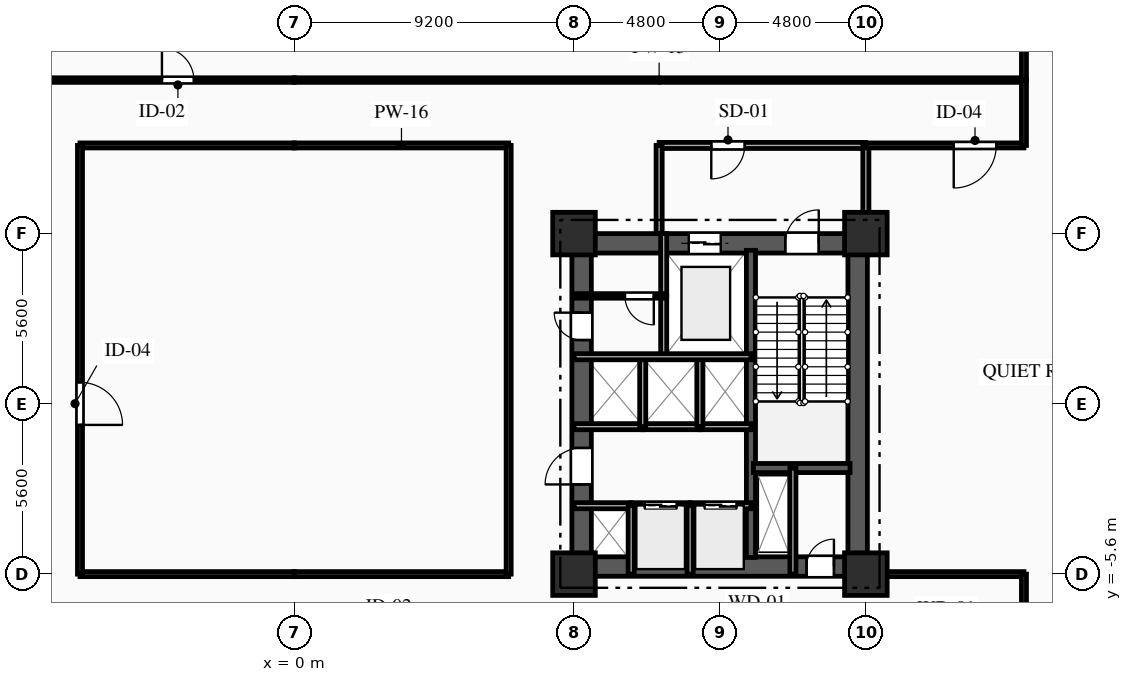
"""IFC4 building model, lengths in metres.
Left out: names, types, materials, properties, quantities, classifications, styles, units other than length and angle.
Written with IfcOpenShell. Run it as: python <this file> out.ifc"""

import sys

from ifc_helpers import new_model, si_unit, direction, frame, frame_2d, origin, origin_2d, place, context, subcontext, project, spatial, rectangle, extrude, element, fill, save


model = new_model("IFC4")
c1 = context("Model", 3, precision=1e-05, world=origin(), true_north=direction((0.0, 1.0)))
c2 = subcontext(c1, "Body", "Model", "MODEL_VIEW")
j1 = project(units=[si_unit("LENGTHUNIT", "METRE"), si_unit("PLANEANGLEUNIT", "RADIAN")], contexts=[c1])
p1 = place(None, origin())
s1 = spatial("IfcSite", under=j1, at=p1, CompositionType="ELEMENT")
p2 = place(p1, origin())
s2 = spatial("IfcBuilding", under=s1, at=p2, CompositionType="ELEMENT")
p3 = place(p2, frame((0.0, 0.0, 4.5)))
s3 = spatial("IfcBuildingStorey", under=s2, at=p3, CompositionType="ELEMENT", Elevation=4.5)
for number, where, z_axis, x_axis in (
    (1, (9.2, -5.6, 0.0), (0.0, 0.0, 1.0), (1.0, 0.0, 0.0)),
    (2, (9.2, 5.6, 0.0), (0.0, 0.0, 1.0), (1.0, 0.0, 0.0)),
    (3, (18.8, -5.6, 0.0), (0.0, 0.0, 1.0), (1.0, 0.0, 0.0)),
    (4, (18.8, 5.6, 0.0), (0.0, 0.0, 1.0), (1.0, 0.0, 0.0)),
):
    element("IfcColumn", number, at=place(p3, frame(where, z_axis=z_axis, x_axis=x_axis)), inside=s3, PredefinedType="COLUMN", context=c2, shape_type="SweptSolid", body=[
        extrude(rectangle(XDim=1.4, YDim=1.4, at=origin_2d()), origin(), (0.0, 0.0, 1.0), 4.5),
    ])
p4 = place(p3, frame((9.2, 5.28, 0.0), z_axis=(0.0, 0.0, 1.0), x_axis=(1.0, 0.0, 0.0)))
e5 = element("IfcWall", 5, at=p4, inside=s3, PredefinedType="SHEAR", context=c2, shape_type="SweptSolid", body=[
    extrude(rectangle(XDim=9.6, YDim=0.64, at=frame_2d((4.8, 0.0))), origin(), (0.0, 0.0, 1.0), 4.17),
])
p5 = place(p4, frame((6.95, 0.0, 0.0)))
e6 = element("IfcOpeningElement", 6, at=p5, cuts=e5, PredefinedType="OPENING", context=c2, shape_type="SweptSolid", body=[
    extrude(rectangle(XDim=1.1, YDim=2.15, at=frame_2d((0.55, 1.075))), frame((0.0, 0.33, 0.0), z_axis=(0.0, -1.0, 0.0), x_axis=(1.0, 0.0, 0.0)), (0.0, 0.0, 1.0), 0.66),
])
p6 = place(p4, frame((3.775, 0.0, 0.0)))
e7 = element("IfcOpeningElement", 7, at=p6, cuts=e5, PredefinedType="OPENING", context=c2, shape_type="SweptSolid", body=[
    extrude(rectangle(XDim=1.05, YDim=2.1, at=frame_2d((0.525, 1.05))), frame((0.0, 0.33, 0.0), z_axis=(0.0, -1.0, 0.0), x_axis=(1.0, 0.0, 0.0)), (0.0, 0.0, 1.0), 0.66),
])
p7 = place(p3, frame((9.2, -5.35, 0.0), z_axis=(0.0, 0.0, 1.0), x_axis=(1.0, 0.0, 0.0)))
e8 = element("IfcWall", 8, at=p7, inside=s3, PredefinedType="SHEAR", context=c2, shape_type="SweptSolid", body=[
    extrude(rectangle(XDim=9.6, YDim=0.64, at=frame_2d((4.8, 0.0))), origin(), (0.0, 0.0, 1.0), 4.17),
])
p8 = place(p7, frame((7.65, 0.0, 0.0)))
e9 = element("IfcOpeningElement", 9, at=p8, cuts=e8, PredefinedType="OPENING", context=c2, shape_type="SweptSolid", body=[
    extrude(rectangle(XDim=0.9, YDim=2.1, at=frame_2d((0.45, 1.05))), frame((0.0, 0.33, 0.0), z_axis=(0.0, -1.0, 0.0), x_axis=(1.0, 0.0, 0.0)), (0.0, 0.0, 1.0), 0.66),
])
p9 = place(p3, frame((9.45, -5.05, 0.0), z_axis=(0.0, 0.0, 1.0), x_axis=(0.0, 1.0, 0.0)))
e10 = element("IfcWall", 10, at=p9, inside=s3, PredefinedType="SHEAR", context=c2, shape_type="SweptSolid", body=[
    extrude(rectangle(XDim=10.1, YDim=0.64, at=frame_2d((5.05, 0.0))), origin(), (0.0, 0.0, 1.0), 4.17),
])
p10 = place(p9, frame((7.15, 0.0, 0.0)))
e11 = element("IfcOpeningElement", 11, at=p10, cuts=e10, PredefinedType="OPENING", context=c2, shape_type="SweptSolid", body=[
    extrude(rectangle(XDim=0.9, YDim=2.1, at=frame_2d((0.45, 1.05))), frame((0.0, 0.33, 0.0), z_axis=(0.0, -1.0, 0.0), x_axis=(1.0, 0.0, 0.0)), (0.0, 0.0, 1.0), 0.66),
])
p11 = place(p9, frame((2.4, 0.0, 0.0)))
e12 = element("IfcOpeningElement", 12, at=p11, cuts=e10, PredefinedType="OPENING", context=c2, shape_type="SweptSolid", body=[
    extrude(rectangle(XDim=1.2, YDim=2.15, at=frame_2d((0.6, 1.075))), frame((0.0, 0.33, 0.0), z_axis=(0.0, -1.0, 0.0), x_axis=(1.0, 0.0, 0.0)), (0.0, 0.0, 1.0), 0.66),
])
p12 = place(p3, frame((18.53, -5.05, 0.0), z_axis=(0.0, 0.0, 1.0), x_axis=(0.0, 1.0, 0.0)))
e13 = element("IfcWall", 13, at=p12, inside=s3, PredefinedType="SHEAR", context=c2, shape_type="SweptSolid", body=[
    extrude(rectangle(XDim=10.1, YDim=0.64, at=frame_2d((5.05, 0.0))), origin(), (0.0, 0.0, 1.0), 4.17),
])
p13 = place(p3, frame((15.02, -5.05, 0.0), z_axis=(0.0, 0.0, 1.0), x_axis=(0.0, 1.0, 0.0)))
e14 = element("IfcWall", 14, at=p13, inside=s3, PredefinedType="SHEAR", context=c2, shape_type="SweptSolid", body=[
    extrude(rectangle(XDim=10.1, YDim=0.3, at=frame_2d((5.05, 0.0))), origin(), (0.0, 0.0, 1.0), 4.17),
])
p14 = place(p3, frame((15.1, -2.11, 0.0), z_axis=(0.0, 0.0, 1.0), x_axis=(1.0, 0.0, 0.0)))
e15 = element("IfcWall", 15, at=p14, inside=s3, PredefinedType="SHEAR", context=c2, shape_type="SweptSolid", body=[
    extrude(rectangle(XDim=3.18, YDim=0.3, at=frame_2d((1.59, 0.0))), origin(), (0.0, 0.0, 1.0), 4.17),
])
p15 = place(p3, frame((16.4, -2.11, 0.0), z_axis=(0.0, 0.0, 1.0), x_axis=(0.0, -1.0, 0.0)))
e16 = element("IfcWall", 16, at=p15, inside=s3, PredefinedType="PARTITIONING", context=c2, shape_type="SweptSolid", body=[
    extrude(rectangle(XDim=3.49, YDim=0.2, at=frame_2d((1.745, 0.0))), origin(), (0.0, 0.0, 1.0), 4.17),
])
p16 = place(p3, frame((12.15, 3.55, 0.0), z_axis=(0.0, 0.0, 1.0), x_axis=(0.0, -1.0, 0.0)))
e17 = element("IfcWall", 17, at=p16, inside=s3, PredefinedType="PARTITIONING", context=c2, shape_type="SweptSolid", body=[
    extrude(rectangle(XDim=2.0, YDim=0.2, at=frame_2d((1.0, 0.0))), origin(), (0.0, 0.0, 1.0), 4.17),
])
p17 = place(p3, frame((12.15, 5.6, 0.0), z_axis=(0.0, 0.0, 1.0), x_axis=(0.0, -1.0, 0.0)))
e18 = element("IfcWall", 18, at=p17, inside=s3, PredefinedType="PARTITIONING", context=c2, shape_type="SweptSolid", body=[
    extrude(rectangle(XDim=2.05, YDim=0.2, at=frame_2d((1.025, 0.0))), origin(), (0.0, 0.0, 1.0), 4.17),
])
p18 = place(p3, frame((18.8, 8.5, 0.0), z_axis=(0.0, 0.0, 1.0), x_axis=(-1.0, 0.0, 0.0)))
e19 = element("IfcWall", 19, at=p18, inside=s3, PredefinedType="PARTITIONING", context=c2, shape_type="SweptSolid", body=[
    extrude(rectangle(XDim=6.8, YDim=0.2, at=frame_2d((3.4, 0.0))), origin(), (0.0, 0.0, 1.0), 4.17),
])
p19 = place(p18, frame((3.985, 0.0, 0.0)))
e20 = element("IfcOpeningElement", 20, at=p19, cuts=e19, PredefinedType="OPENING", context=c2, shape_type="SweptSolid", body=[
    extrude(rectangle(XDim=1.1, YDim=2.15, at=frame_2d((0.55, 1.075))), frame((0.0, 0.11, 0.0), z_axis=(0.0, -1.0, 0.0), x_axis=(1.0, 0.0, 0.0)), (0.0, 0.0, 1.0), 0.22),
])
p20 = place(p3, frame((12.0, 8.5, 0.0), z_axis=(0.0, 0.0, 1.0), x_axis=(0.0, -1.0, 0.0)))
e21 = element("IfcWall", 21, at=p20, inside=s3, PredefinedType="PARTITIONING", context=c2, shape_type="SweptSolid", body=[
    extrude(rectangle(XDim=2.9, YDim=0.2, at=frame_2d((1.45, 0.0))), origin(), (0.0, 0.0, 1.0), 4.17),
])
p21 = place(p3, frame((18.8, 5.6, 0.0), z_axis=(0.0, 0.0, 1.0), x_axis=(0.0, 1.0, 0.0)))
e22 = element("IfcWall", 22, at=p21, inside=s3, PredefinedType="PARTITIONING", context=c2, shape_type="SweptSolid", body=[
    extrude(rectangle(XDim=2.9, YDim=0.2, at=frame_2d((1.45, 0.0))), origin(), (0.0, 0.0, 1.0), 3.655),
])
p22 = place(p3, frame((12.15, 3.55, 0.0), z_axis=(0.0, 0.0, 1.0), x_axis=(-1.0, 0.0, 0.0)))
e23 = element("IfcWall", 23, at=p22, inside=s3, PredefinedType="PARTITIONING", context=c2, shape_type="SweptSolid", body=[
    extrude(rectangle(XDim=2.95, YDim=0.15, at=frame_2d((1.475, 0.0))), origin(), (0.0, 0.0, 1.0), 4.17),
])
p23 = place(p22, frame((0.325, 0.0, 0.0)))
e24 = element("IfcOpeningElement", 24, at=p23, cuts=e23, PredefinedType="OPENING", context=c2, shape_type="SweptSolid", body=[
    extrude(rectangle(XDim=0.95, YDim=2.1, at=frame_2d((0.475, 1.05))), frame((0.0, 0.085, 0.0), z_axis=(0.0, -1.0, 0.0), x_axis=(1.0, 0.0, 0.0)), (0.0, 0.0, 1.0), 0.17),
])
p24 = place(p3, frame((9.2, -3.35, 0.0), z_axis=(0.0, 0.0, 1.0), x_axis=(1.0, 0.0, 0.0)))
e25 = element("IfcWall", 25, at=p24, inside=s3, PredefinedType="PARTITIONING", context=c2, shape_type="SweptSolid", body=[
    extrude(rectangle(XDim=1.88, YDim=0.2, at=frame_2d((0.94, 0.0))), origin(), (0.0, 0.0, 1.0), 3.885),
])
p25 = place(p3, frame((11.08, -3.35, 0.0), z_axis=(0.0, 0.0, 1.0), x_axis=(1.0, 0.0, 0.0)))
e26 = element("IfcWall", 26, at=p25, inside=s3, PredefinedType="PARTITIONING", context=c2, shape_type="SweptSolid", body=[
    extrude(rectangle(XDim=1.94, YDim=0.2, at=frame_2d((0.97, 0.0))), origin(), (0.0, 0.0, 1.0), 4.17),
])
p26 = place(p25, frame((0.445, 0.0, 0.0)))
e27 = element("IfcOpeningElement", 27, at=p26, cuts=e26, PredefinedType="OPENING", context=c2, shape_type="SweptSolid", body=[
    extrude(rectangle(XDim=1.05, YDim=2.1, at=frame_2d((0.525, 1.05))), frame((0.0, 0.11, 0.0), z_axis=(0.0, -1.0, 0.0), x_axis=(1.0, 0.0, 0.0)), (0.0, 0.0, 1.0), 0.22),
])
p27 = place(p3, frame((13.02, -3.35, 0.0), z_axis=(0.0, 0.0, 1.0), x_axis=(1.0, 0.0, 0.0)))
e28 = element("IfcWall", 28, at=p27, inside=s3, PredefinedType="PARTITIONING", context=c2, shape_type="SweptSolid", body=[
    extrude(rectangle(XDim=2.0, YDim=0.2, at=frame_2d((1.0, 0.0))), origin(), (0.0, 0.0, 1.0), 4.17),
])
p28 = place(p27, frame((0.475, 0.0, 0.0)))
e29 = element("IfcOpeningElement", 29, at=p28, cuts=e28, PredefinedType="OPENING", context=c2, shape_type="SweptSolid", body=[
    extrude(rectangle(XDim=1.05, YDim=2.1, at=frame_2d((0.525, 1.05))), frame((0.0, 0.11, 0.0), z_axis=(0.0, -1.0, 0.0), x_axis=(1.0, 0.0, 0.0)), (0.0, 0.0, 1.0), 0.22),
])
p29 = place(p3, frame((11.46, -0.75, 0.0), z_axis=(0.0, 0.0, 1.0), x_axis=(-1.0, 0.0, 0.0)))
e30 = element("IfcWall", 30, at=p29, inside=s3, PredefinedType="PARTITIONING", context=c2, shape_type="SweptSolid", body=[
    extrude(rectangle(XDim=2.26, YDim=0.2, at=frame_2d((1.13, 0.0))), origin(), (0.0, 0.0, 1.0), 4.17),
])
p30 = place(p3, frame((13.34, -0.75, 0.0), z_axis=(0.0, 0.0, 1.0), x_axis=(-1.0, 0.0, 0.0)))
e31 = element("IfcWall", 31, at=p30, inside=s3, PredefinedType="PARTITIONING", context=c2, shape_type="SweptSolid", body=[
    extrude(rectangle(XDim=1.88, YDim=0.2, at=frame_2d((0.94, 0.0))), origin(), (0.0, 0.0, 1.0), 4.17),
])
p31 = place(p3, frame((15.02, -0.75, 0.0), z_axis=(0.0, 0.0, 1.0), x_axis=(-1.0, 0.0, 0.0)))
e32 = element("IfcWall", 32, at=p31, inside=s3, PredefinedType="PARTITIONING", context=c2, shape_type="SweptSolid", body=[
    extrude(rectangle(XDim=1.68, YDim=0.2, at=frame_2d((0.84, 0.0))), origin(), (0.0, 0.0, 1.0), 4.17),
])
for number, where, z_axis, x_axis in (
    (33, (11.08, -5.6, 0.0), (0.0, 0.0, 1.0), (0.0, 1.0, 0.0)),
    (34, (13.02, -5.6, 0.0), (0.0, 0.0, 1.0), (0.0, 1.0, 0.0)),
):
    element("IfcWall", number, at=place(p3, frame(where, z_axis=z_axis, x_axis=x_axis)), inside=s3, PredefinedType="PARTITIONING", context=c2, shape_type="SweptSolid", body=[
        extrude(rectangle(XDim=2.25, YDim=0.2, at=frame_2d((1.125, 0.0))), origin(), (0.0, 0.0, 1.0), 4.17),
    ])
for number, where, z_axis, x_axis in (
    (35, (11.46, -0.75, 0.0), (0.0, 0.0, 1.0), (0.0, 1.0, 0.0)),
    (36, (13.34, -0.75, 0.0), (0.0, 0.0, 1.0), (0.0, 1.0, 0.0)),
):
    element("IfcWall", number, at=place(p3, frame(where, z_axis=z_axis, x_axis=x_axis)), inside=s3, PredefinedType="PARTITIONING", context=c2, shape_type="SweptSolid", body=[
        extrude(rectangle(XDim=2.3, YDim=0.2, at=frame_2d((1.15, 0.0))), origin(), (0.0, 0.0, 1.0), 4.17),
    ])
p32 = place(p3, frame((-24.0, 10.65, 0.0), z_axis=(0.0, 0.0, 1.0), x_axis=(1.0, 0.0, 0.0)))
e37 = element("IfcWall", 37, at=p32, inside=s3, PredefinedType="PARTITIONING", context=c2, shape_type="SweptSolid", body=[
    extrude(rectangle(XDim=24.0, YDim=0.15, at=frame_2d((12.0, 0.0))), origin(), (0.0, 0.0, 1.0), 4.17),
])
p33 = place(p32, frame((19.646, 0.0, 0.0)))
e38 = element("IfcOpeningElement", 38, at=p33, cuts=e37, PredefinedType="OPENING", context=c2, shape_type="SweptSolid", body=[
    extrude(rectangle(XDim=1.05, YDim=2.15, at=frame_2d((0.525, 1.075))), frame((0.0, 0.085, 0.0), z_axis=(0.0, -1.0, 0.0), x_axis=(1.0, 0.0, 0.0)), (0.0, 0.0, 1.0), 0.17),
])
p34 = place(p3, frame((0.0, 8.5, 0.0), z_axis=(0.0, 0.0, 1.0), x_axis=(-1.0, 0.0, 0.0)))
e39 = element("IfcWall", 39, at=p34, inside=s3, PredefinedType="PARTITIONING", context=c2, shape_type="SweptSolid", body=[
    extrude(rectangle(XDim=7.05, YDim=0.165, at=frame_2d((3.525, 0.0))), origin(), (0.0, 0.0, 1.0), 4.17),
])
p35 = place(p3, frame((0.0, 10.65, 0.0), z_axis=(0.0, 0.0, 1.0), x_axis=(1.0, 0.0, 0.0)))
e40 = element("IfcWall", 40, at=p35, inside=s3, PredefinedType="PARTITIONING", context=c2, shape_type="SweptSolid", body=[
    extrude(rectangle(XDim=24.0, YDim=0.15, at=frame_2d((12.0, 0.0))), origin(), (0.0, 0.0, 1.0), 4.17),
])
p36 = place(p3, frame((7.05, 8.5, 0.0), z_axis=(0.0, 0.0, 1.0), x_axis=(-1.0, 0.0, 0.0)))
e41 = element("IfcWall", 41, at=p36, inside=s3, PredefinedType="PARTITIONING", context=c2, shape_type="SweptSolid", body=[
    extrude(rectangle(XDim=7.05, YDim=0.165, at=frame_2d((3.525, 0.0))), origin(), (0.0, 0.0, 1.0), 4.17),
])
p37 = place(p3, frame((24.0, 8.5, 0.0), z_axis=(0.0, 0.0, 1.0), x_axis=(-1.0, 0.0, 0.0)))
e42 = element("IfcWall", 42, at=p37, inside=s3, PredefinedType="PARTITIONING", context=c2, shape_type="SweptSolid", body=[
    extrude(rectangle(XDim=5.2, YDim=0.165, at=frame_2d((2.6, 0.0))), origin(), (0.0, 0.0, 1.0), 4.17),
])
p38 = place(p37, frame((0.91, 0.0, 0.0)))
e43 = element("IfcOpeningElement", 43, at=p38, cuts=e42, PredefinedType="OPENING", context=c2, shape_type="SweptSolid", body=[
    extrude(rectangle(XDim=1.4, YDim=2.3, at=frame_2d((0.7, 1.15))), frame((0.0, 0.093, 0.0), z_axis=(0.0, -1.0, 0.0), x_axis=(1.0, 0.0, 0.0)), (0.0, 0.0, 1.0), 0.185),
])
p39 = place(p3, frame((24.0, 10.65, 0.0), z_axis=(0.0, 0.0, 1.0), x_axis=(0.0, -1.0, 0.0)))
e44 = element("IfcWall", 44, at=p39, inside=s3, PredefinedType="PARTITIONING", context=c2, shape_type="SweptSolid", body=[
    extrude(rectangle(XDim=2.15, YDim=0.165, at=frame_2d((1.075, 0.0))), origin(), (0.0, 0.0, 1.0), 4.17),
])
for number, where, z_axis, x_axis in (
    (45, (-7.05, -5.6, 0.0), (0.0, 0.0, 1.0), (1.0, 0.0, 0.0)),
    (46, (0.0, -5.6, 0.0), (0.0, 0.0, 1.0), (1.0, 0.0, 0.0)),
):
    element("IfcWall", number, at=place(p3, frame(where, z_axis=z_axis, x_axis=x_axis)), inside=s3, PredefinedType="PARTITIONING", context=c2, shape_type="SweptSolid", body=[
        extrude(rectangle(XDim=7.05, YDim=0.165, at=frame_2d((3.525, 0.0))), origin(), (0.0, 0.0, 1.0), 3.655),
    ])
p40 = place(p3, frame((18.8, -5.6, 0.0), z_axis=(0.0, 0.0, 1.0), x_axis=(1.0, 0.0, 0.0)))
e47 = element("IfcWall", 47, at=p40, inside=s3, PredefinedType="PARTITIONING", context=c2, shape_type="SweptSolid", body=[
    extrude(rectangle(XDim=5.2, YDim=0.165, at=frame_2d((2.6, 0.0))), origin(), (0.0, 0.0, 1.0), 4.17),
])
p41 = place(p3, frame((24.0, -5.6, 0.0), z_axis=(0.0, 0.0, 1.0), x_axis=(0.0, -1.0, 0.0)))
e48 = element("IfcWall", 48, at=p41, inside=s3, PredefinedType="PARTITIONING", context=c2, shape_type="SweptSolid", body=[
    extrude(rectangle(XDim=2.15, YDim=0.165, at=frame_2d((1.075, 0.0))), origin(), (0.0, 0.0, 1.0), 4.17),
])
p42 = place(p3, frame((-7.05, 8.5, 0.0), z_axis=(0.0, 0.0, 1.0), x_axis=(0.0, -1.0, 0.0)))
e49 = element("IfcWall", 49, at=p42, inside=s3, PredefinedType="PARTITIONING", context=c2, shape_type="SweptSolid", body=[
    extrude(rectangle(XDim=14.1, YDim=0.165, at=frame_2d((7.05, 0.0))), origin(), (0.0, 0.0, 1.0), 4.17),
])
p43 = place(p42, frame((7.792, 0.0, 0.0)))
e50 = element("IfcOpeningElement", 50, at=p43, cuts=e49, PredefinedType="OPENING", context=c2, shape_type="SweptSolid", body=[
    extrude(rectangle(XDim=1.4, YDim=2.3, at=frame_2d((0.7, 1.15))), frame((0.0, 0.093, 0.0), z_axis=(0.0, -1.0, 0.0), x_axis=(1.0, 0.0, 0.0)), (0.0, 0.0, 1.0), 0.185),
])
p44 = place(p3, frame((7.05, -5.6, 0.0), z_axis=(0.0, 0.0, 1.0), x_axis=(0.0, 1.0, 0.0)))
e51 = element("IfcWall", 51, at=p44, inside=s3, PredefinedType="PARTITIONING", context=c2, shape_type="SweptSolid", body=[
    extrude(rectangle(XDim=14.1, YDim=0.165, at=frame_2d((7.05, 0.0))), origin(), (0.0, 0.0, 1.0), 4.17),
])
p45 = place(p3, frame((24.0, 24.8, 0.0), z_axis=(0.0, 0.0, 1.0), x_axis=(0.0, -1.0, 0.0)))
e52 = element("IfcWall", 52, at=p45, inside=s3, PredefinedType="PARTITIONING", context=c2, shape_type="SweptSolid", body=[
    extrude(rectangle(XDim=14.15, YDim=0.165, at=frame_2d((7.075, 0.0))), origin(), (0.0, 0.0, 1.0), 4.17),
])
p46 = place(p3, frame((9.2, 1.55, 0.0), z_axis=(0.0, 0.0, 1.0), x_axis=(1.0, 0.0, 0.0)))
e53 = element("IfcWall", 53, at=p46, inside=s3, PredefinedType="PARTITIONING", context=c2, shape_type="SweptSolid", body=[
    extrude(rectangle(XDim=5.82, YDim=0.2, at=frame_2d((2.91, 0.0))), origin(), (0.0, 0.0, 1.0), 4.17),
])
p47 = place(p5, origin())
e54 = element("IfcDoor", 54, at=p47, inside=s3, OperationType="SINGLE_SWING_RIGHT", PredefinedType="DOOR", context=c2, shape_type="SweptSolid", body=[
    extrude(rectangle(XDim=1.1, YDim=2.15, at=frame_2d((0.55, 1.075))), frame((0.0, 0.025, 0.0), z_axis=(0.0, -1.0, 0.0), x_axis=(1.0, 0.0, 0.0)), (0.0, 0.0, 1.0), 0.05),
])
fill(e6, e54)
p48 = place(p6, origin())
e55 = element("IfcDoor", 55, at=p48, inside=s3, OperationType="DOUBLE_DOOR_SLIDING", PredefinedType="DOOR", context=c2, shape_type="SweptSolid", body=[
    extrude(rectangle(XDim=1.05, YDim=2.1, at=frame_2d((0.525, 1.05))), frame((0.0, 0.025, 0.0), z_axis=(0.0, -1.0, 0.0), x_axis=(1.0, 0.0, 0.0)), (0.0, 0.0, 1.0), 0.05),
])
fill(e7, e55)
p49 = place(p8, origin())
e56 = element("IfcDoor", 56, at=p49, inside=s3, OperationType="SINGLE_SWING_RIGHT", PredefinedType="DOOR", context=c2, shape_type="SweptSolid", body=[
    extrude(rectangle(XDim=0.9, YDim=2.1, at=frame_2d((0.45, 1.05))), frame((0.0, 0.025, 0.0), z_axis=(0.0, -1.0, 0.0), x_axis=(1.0, 0.0, 0.0)), (0.0, 0.0, 1.0), 0.05),
])
fill(e9, e56)
p50 = place(p19, origin())
e57 = element("IfcDoor", 57, at=p50, inside=s3, OperationType="SINGLE_SWING_RIGHT", PredefinedType="DOOR", context=c2, shape_type="SweptSolid", body=[
    extrude(rectangle(XDim=1.1, YDim=2.15, at=frame_2d((0.55, 1.075))), frame((0.0, 0.025, 0.0), z_axis=(0.0, -1.0, 0.0), x_axis=(1.0, 0.0, 0.0)), (0.0, 0.0, 1.0), 0.05),
])
fill(e20, e57)
p51 = place(p23, origin())
e58 = element("IfcDoor", 58, at=p51, inside=s3, OperationType="SINGLE_SWING_LEFT", PredefinedType="DOOR", context=c2, shape_type="SweptSolid", body=[
    extrude(rectangle(XDim=0.95, YDim=2.1, at=frame_2d((0.475, 1.05))), frame((0.0, 0.025, 0.0), z_axis=(0.0, -1.0, 0.0), x_axis=(1.0, 0.0, 0.0)), (0.0, 0.0, 1.0), 0.05),
])
fill(e24, e58)
p52 = place(p10, origin())
e59 = element("IfcDoor", 59, at=p52, inside=s3, OperationType="SINGLE_SWING_RIGHT", PredefinedType="DOOR", context=c2, shape_type="SweptSolid", body=[
    extrude(rectangle(XDim=0.9, YDim=2.1, at=frame_2d((0.45, 1.05))), frame((0.0, 0.025, 0.0), z_axis=(0.0, -1.0, 0.0), x_axis=(1.0, 0.0, 0.0)), (0.0, 0.0, 1.0), 0.05),
])
fill(e11, e59)
p53 = place(p26, origin())
e60 = element("IfcDoor", 60, at=p53, inside=s3, OperationType="DOUBLE_DOOR_SLIDING", PredefinedType="DOOR", context=c2, shape_type="SweptSolid", body=[
    extrude(rectangle(XDim=1.05, YDim=2.1, at=frame_2d((0.525, 1.05))), frame((0.0, 0.025, 0.0), z_axis=(0.0, -1.0, 0.0), x_axis=(1.0, 0.0, 0.0)), (0.0, 0.0, 1.0), 0.05),
])
fill(e27, e60)
p54 = place(p28, origin())
e61 = element("IfcDoor", 61, at=p54, inside=s3, OperationType="DOUBLE_DOOR_SLIDING", PredefinedType="DOOR", context=c2, shape_type="SweptSolid", body=[
    extrude(rectangle(XDim=1.05, YDim=2.1, at=frame_2d((0.525, 1.05))), frame((0.0, 0.025, 0.0), z_axis=(0.0, -1.0, 0.0), x_axis=(1.0, 0.0, 0.0)), (0.0, 0.0, 1.0), 0.05),
])
fill(e29, e61)
p55 = place(p11, origin())
e62 = element("IfcDoor", 62, at=p55, inside=s3, OperationType="SINGLE_SWING_LEFT", PredefinedType="DOOR", context=c2, shape_type="SweptSolid", body=[
    extrude(rectangle(XDim=1.2, YDim=2.15, at=frame_2d((0.6, 1.075))), frame((0.0, 0.025, 0.0), z_axis=(0.0, -1.0, 0.0), x_axis=(1.0, 0.0, 0.0)), (0.0, 0.0, 1.0), 0.05),
])
fill(e12, e62)
p56 = place(p33, origin())
e63 = element("IfcDoor", 63, at=p56, inside=s3, OperationType="SINGLE_SWING_LEFT", PredefinedType="DOOR", context=c2, shape_type="SweptSolid", body=[
    extrude(rectangle(XDim=1.05, YDim=2.15, at=frame_2d((0.525, 1.075))), frame((0.0, 0.025, 0.0), z_axis=(0.0, -1.0, 0.0), x_axis=(1.0, 0.0, 0.0)), (0.0, 0.0, 1.0), 0.05),
])
fill(e38, e63)
p57 = place(p38, origin())
e64 = element("IfcDoor", 64, at=p57, inside=s3, OperationType="SINGLE_SWING_RIGHT", PredefinedType="DOOR", context=c2, shape_type="SweptSolid", body=[
    extrude(rectangle(XDim=1.4, YDim=2.3, at=frame_2d((0.7, 1.15))), frame((0.0, 0.025, 0.0), z_axis=(0.0, -1.0, 0.0), x_axis=(1.0, 0.0, 0.0)), (0.0, 0.0, 1.0), 0.05),
])
fill(e43, e64)
p58 = place(p43, origin())
e65 = element("IfcDoor", 65, at=p58, inside=s3, OperationType="SINGLE_SWING_RIGHT", PredefinedType="DOOR", context=c2, shape_type="SweptSolid", body=[
    extrude(rectangle(XDim=1.4, YDim=2.3, at=frame_2d((0.7, 1.15))), frame((0.0, 0.025, 0.0), z_axis=(0.0, -1.0, 0.0), x_axis=(1.0, 0.0, 0.0)), (0.0, 0.0, 1.0), 0.05),
])
fill(e50, e65)
save(model, sys.argv[1])
